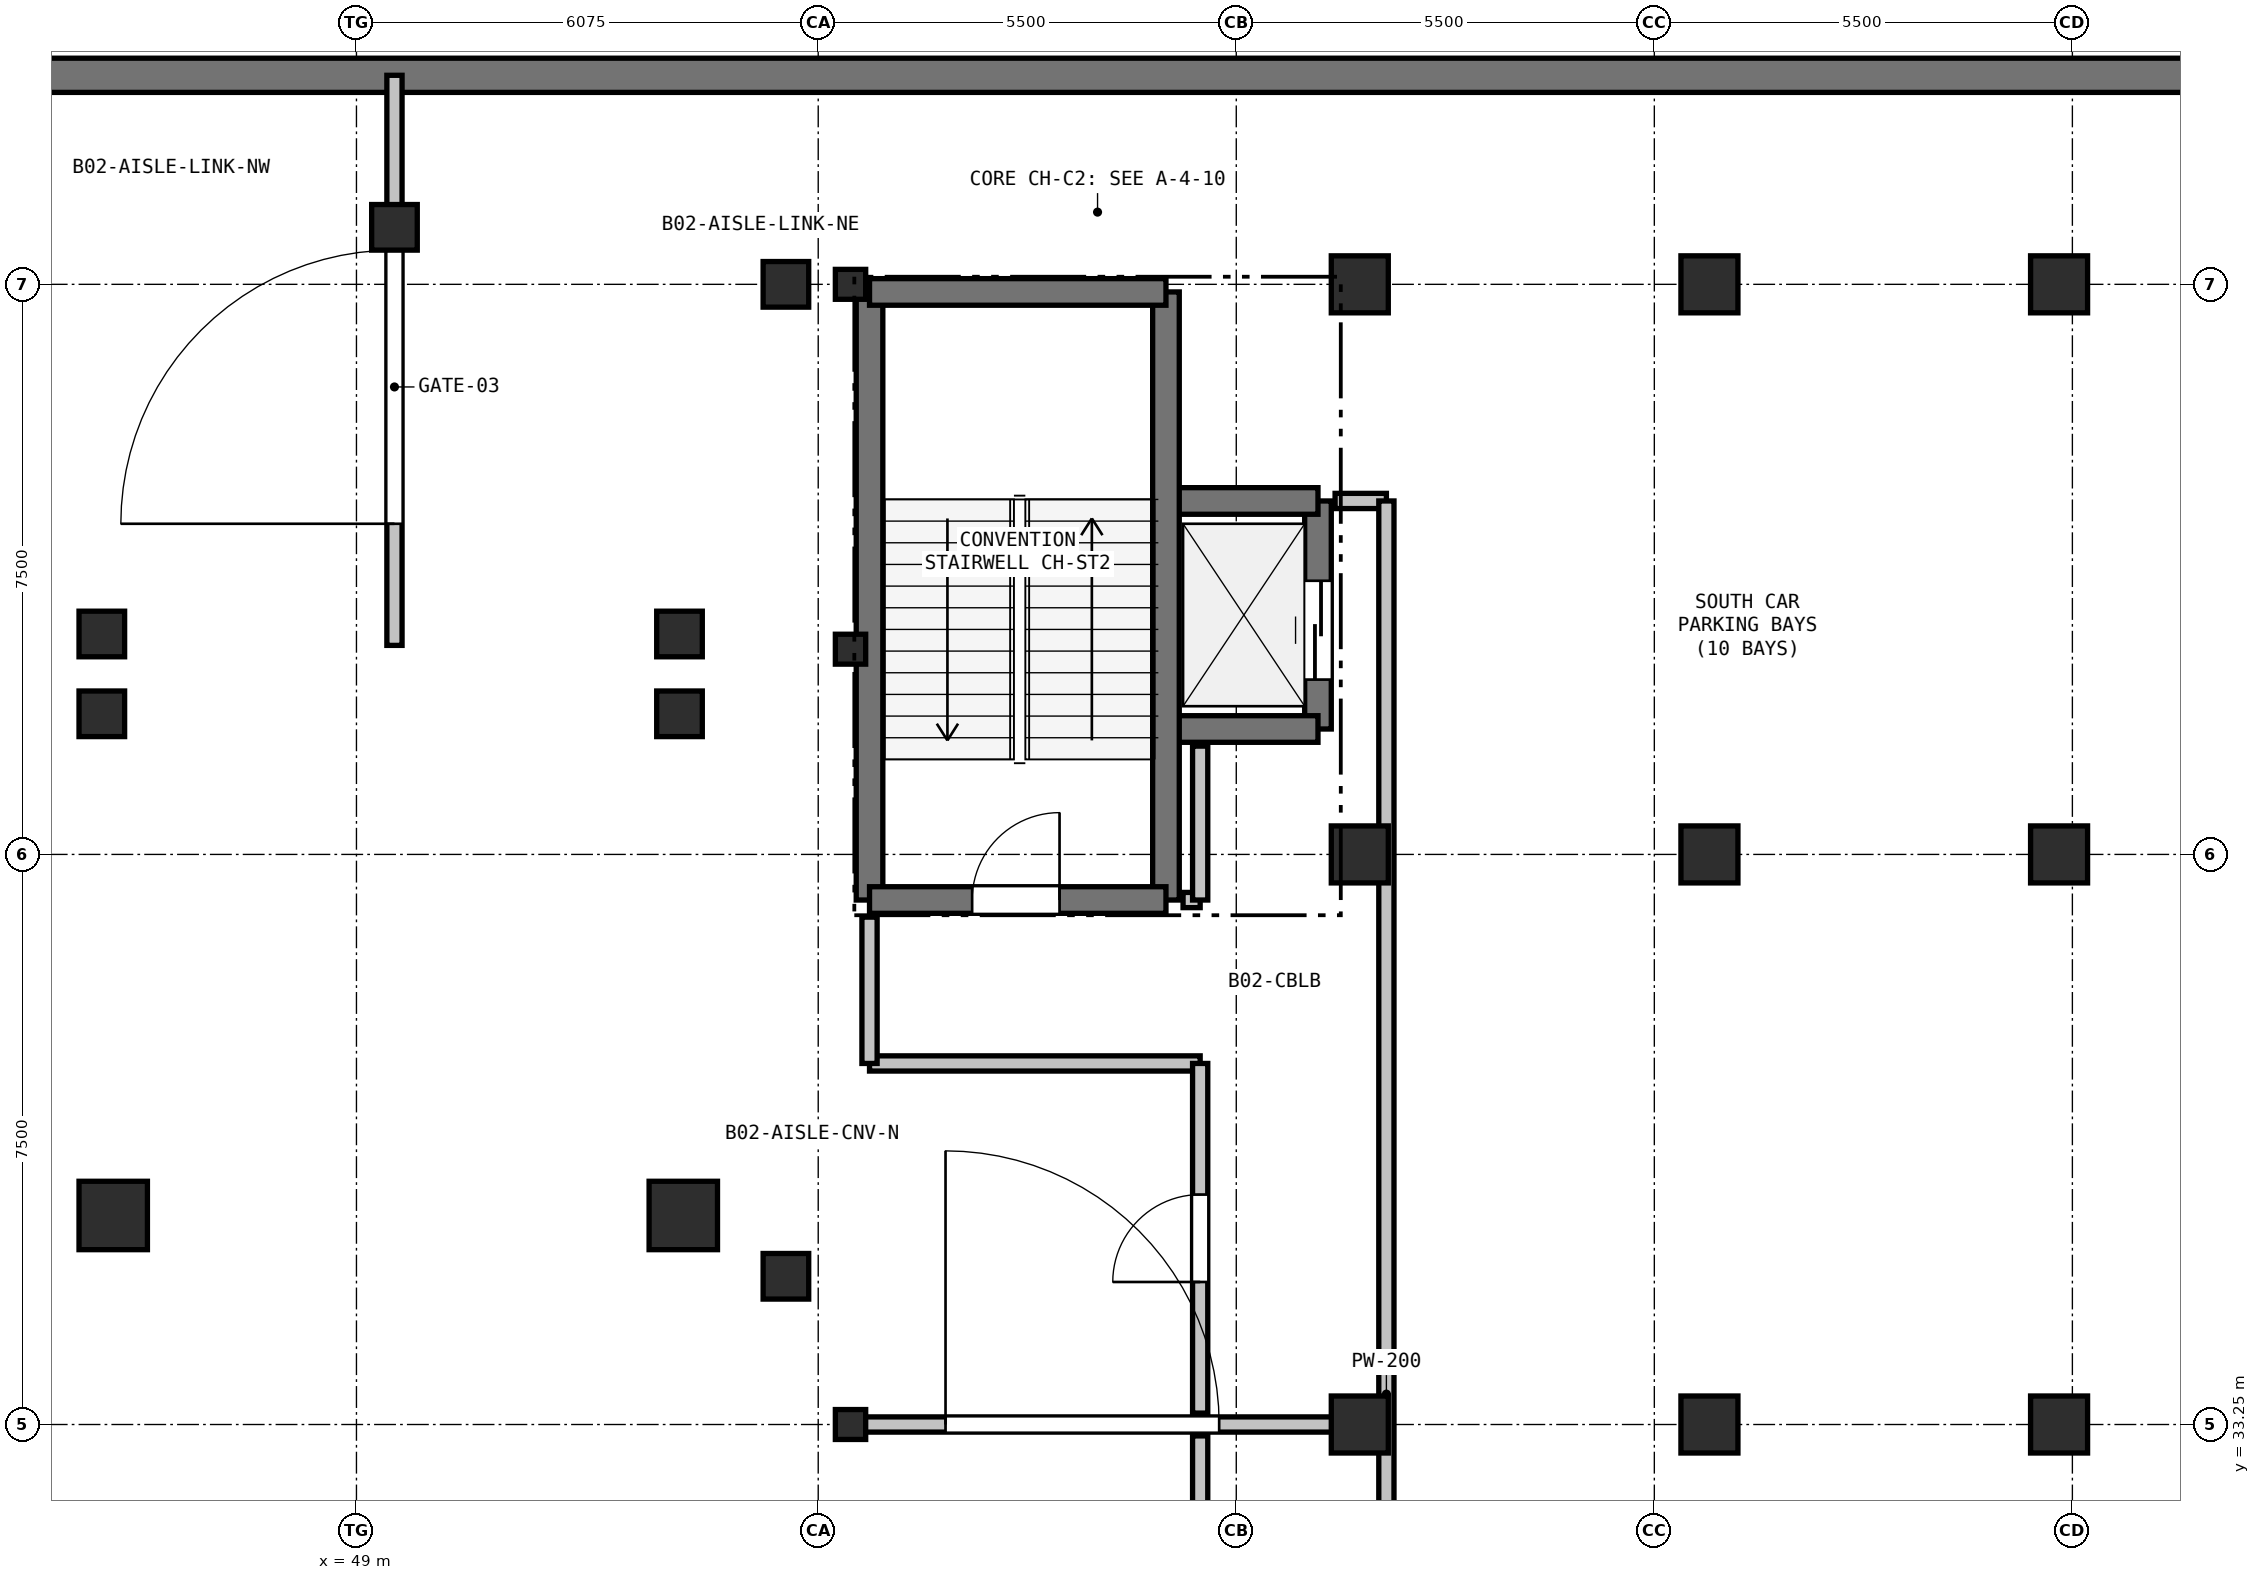
"""IFC4 building model, lengths in metres.
Left out: names, types, materials, properties, quantities, classifications, styles, units other than length and angle.
Written with IfcOpenShell. Run it as: python <this file> out.ifc"""

import sys

from ifc_helpers import new_model, si_unit, direction, frame, frame_2d, origin, origin_2d, place, context, subcontext, project, spatial, rectangle, i_section, extrude, element, fill, save


model = new_model("IFC4")
c1 = context("Model", 3, precision=1e-05, world=origin(), true_north=direction((0.0, 1.0)))
c2 = subcontext(c1, "Body", "Model", "MODEL_VIEW")
j1 = project(units=[si_unit("LENGTHUNIT", "METRE"), si_unit("PLANEANGLEUNIT", "RADIAN")], contexts=[c1])
p1 = place(None, origin())
s1 = spatial("IfcSite", under=j1, at=p1, CompositionType="ELEMENT")
p2 = place(p1, origin())
s2 = spatial("IfcBuilding", under=s1, at=p2, CompositionType="ELEMENT")
p3 = place(p2, frame((0.0, 0.0, -9.0)))
s3 = spatial("IfcBuildingStorey", under=s2, at=p3, CompositionType="ELEMENT", Elevation=-9.0)
p4 = place(p3, frame((77.0, 51.0, 0.0), z_axis=(0.0, 0.0, 1.0), x_axis=(-1.0, 0.0, 0.0)))
e1 = element("IfcWall", 1, at=p4, inside=s3, PredefinedType="USERDEFINED", context=c2, shape_type="SweptSolid", body=[
    extrude(rectangle(XDim=81.5, YDim=0.45, at=frame_2d((40.75, 0.0))), origin(), (0.0, 0.0, 1.0), 4.5),
])
for number, where, z_axis, x_axis in (
    (2, (45.65, 42.6, 0.0), (0.0, 0.0, 1.0), (1.0, 0.0, 0.0)),
    (3, (53.25, 42.6, 0.0), (0.0, 0.0, 1.0), (1.0, 0.0, 0.0)),
    (4, (49.5, 49.0, 0.0), (0.0, 0.0, 1.0), (1.0, 0.0, 0.0)),
    (5, (45.65, 43.65, 0.0), (0.0, 0.0, 1.0), (1.0, 0.0, 0.0)),
    (6, (53.25, 43.65, 0.0), (0.0, 0.0, 1.0), (1.0, 0.0, 0.0)),
):
    element("IfcColumn", number, at=place(p3, frame(where, z_axis=z_axis, x_axis=x_axis)), inside=s3, PredefinedType="COLUMN", context=c2, shape_type="SweptSolid", body=[
        extrude(rectangle(XDim=0.6, YDim=0.6, at=origin_2d()), origin(), (0.0, 0.0, 1.0), 4.5),
    ])
for number, where, z_axis, x_axis in (
    (7, (45.8, 36.0, 0.0), (0.0, 0.0, 1.0), (1.0, 0.0, 0.0)),
    (8, (53.3, 36.0, 0.0), (0.0, 0.0, 1.0), (1.0, 0.0, 0.0)),
):
    element("IfcColumn", number, at=place(p3, frame(where, z_axis=z_axis, x_axis=x_axis)), inside=s3, PredefinedType="COLUMN", context=c2, shape_type="SweptSolid", body=[
        extrude(rectangle(XDim=0.9, YDim=0.9, at=origin_2d()), origin(), (0.0, 0.0, 1.0), 4.5),
    ])
for number, where, z_axis, x_axis in (
    (9, (54.65, 35.2, 0.0), (0.0, 0.0, 1.0), (1.0, 0.0, 0.0)),
    (10, (54.65, 48.25, 0.0), (0.0, 0.0, 1.0), (1.0, 0.0, 0.0)),
):
    element("IfcColumn", number, at=place(p3, frame(where, z_axis=z_axis, x_axis=x_axis)), inside=s3, PredefinedType="COLUMN", context=c2, shape_type="SweptSolid", body=[
        extrude(rectangle(XDim=0.6, YDim=0.6, at=origin_2d()), origin(), (0.0, 0.0, 1.0), 4.2),
    ])
for number, where, z_axis, x_axis in (
    (11, (55.5, 33.25, 0.0), (0.0, 0.0, 1.0), (1.0, 0.0, 0.0)),
    (12, (55.5, 43.45, 0.0), (0.0, 0.0, 1.0), (1.0, 0.0, 0.0)),
    (13, (55.5, 48.25, 0.0), (0.0, 0.0, 1.0), (1.0, 0.0, 0.0)),
):
    element("IfcColumn", number, at=place(p3, frame(where, z_axis=z_axis, x_axis=x_axis)), inside=s3, PredefinedType="COLUMN", context=c2, shape_type="SweptSolid", body=[
        extrude(i_section(OverallWidth=0.399, OverallDepth=0.394, WebThickness=0.023, FlangeThickness=0.037, at=origin_2d()), origin(), (0.0, 0.0, 1.0), 4.5),
    ])
for number, where, z_axis, x_axis in (
    (14, (62.2, 33.25, 0.0), (0.0, 0.0, 1.0), (1.0, 0.0, 0.0)),
    (15, (62.2, 40.75, 0.0), (0.0, 0.0, 1.0), (1.0, 0.0, 0.0)),
    (16, (62.2, 48.25, 0.0), (0.0, 0.0, 1.0), (1.0, 0.0, 0.0)),
    (17, (66.8, 33.25, 0.0), (0.0, 0.0, 1.0), (1.0, 0.0, 0.0)),
    (18, (66.8, 40.75, 0.0), (0.0, 0.0, 1.0), (1.0, 0.0, 0.0)),
    (19, (66.8, 48.25, 0.0), (0.0, 0.0, 1.0), (1.0, 0.0, 0.0)),
    (20, (71.4, 33.25, 0.0), (0.0, 0.0, 1.0), (1.0, 0.0, 0.0)),
    (21, (71.4, 40.75, 0.0), (0.0, 0.0, 1.0), (1.0, 0.0, 0.0)),
    (22, (71.4, 48.25, 0.0), (0.0, 0.0, 1.0), (1.0, 0.0, 0.0)),
):
    element("IfcColumn", number, at=place(p3, frame(where, z_axis=z_axis, x_axis=x_axis)), inside=s3, PredefinedType="COLUMN", context=c2, shape_type="SweptSolid", body=[
        extrude(rectangle(XDim=0.75, YDim=0.75, at=origin_2d()), origin(), (0.0, 0.0, 1.0), 4.5),
    ])
p5 = place(p3, frame((61.65, 42.4, 0.0), z_axis=(0.0, 0.0, 1.0), x_axis=(0.0, 1.0, 0.0)))
e23 = element("IfcWall", 23, at=p5, inside=s3, PredefinedType="SHEAR", context=c2, shape_type="SweptSolid", body=[
    extrude(rectangle(XDim=3.0, YDim=0.35, at=frame_2d((1.5, 0.0))), origin(), (0.0, 0.0, 1.0), 4.2),
])
p6 = place(p5, frame((0.65, 0.0, 0.0)))
e24 = element("IfcOpeningElement", 24, at=p6, cuts=e23, PredefinedType="OPENING", context=c2, shape_type="SweptSolid", body=[
    extrude(rectangle(XDim=1.3, YDim=2.2, at=frame_2d((0.65, 1.1))), frame((0.0, 0.185, 0.0), z_axis=(0.0, -1.0, 0.0), x_axis=(1.0, 0.0, 0.0)), (0.0, 0.0, 1.0), 0.37),
])
for number, where, z_axis, x_axis in (
    (25, (59.65, 45.4, 0.0), (0.0, 0.0, 1.0), (1.0, 0.0, 0.0)),
    (26, (59.65, 42.4, 0.0), (0.0, 0.0, 1.0), (1.0, 0.0, 0.0)),
):
    element("IfcWall", number, at=place(p3, frame(where, z_axis=z_axis, x_axis=x_axis)), inside=s3, PredefinedType="SHEAR", context=c2, shape_type="SweptSolid", body=[
        extrude(rectangle(XDim=2.0, YDim=0.35, at=frame_2d((1.0, 0.0))), origin(), (0.0, 0.0, 1.0), 4.2),
    ])
for number, where, z_axis, x_axis in (
    (27, (59.65, 48.15, 0.0), (0.0, 0.0, 1.0), (0.0, -1.0, 0.0)),
    (28, (55.75, 40.15, 0.0), (0.0, 0.0, 1.0), (0.0, 1.0, 0.0)),
):
    element("IfcWall", number, at=place(p3, frame(where, z_axis=z_axis, x_axis=x_axis)), inside=s3, PredefinedType="SHEAR", context=c2, shape_type="SweptSolid", body=[
        extrude(rectangle(XDim=8.0, YDim=0.35, at=frame_2d((4.0, 0.0))), origin(), (0.0, 0.0, 1.0), 4.2),
    ])
p7 = place(p3, frame((55.75, 48.15, 0.0), z_axis=(0.0, 0.0, 1.0), x_axis=(1.0, 0.0, 0.0)))
e29 = element("IfcWall", 29, at=p7, inside=s3, PredefinedType="SHEAR", context=c2, shape_type="SweptSolid", body=[
    extrude(rectangle(XDim=3.9, YDim=0.35, at=frame_2d((1.95, 0.0))), origin(), (0.0, 0.0, 1.0), 4.2),
])
p8 = place(p3, frame((55.75, 40.15, 0.0), z_axis=(0.0, 0.0, 1.0), x_axis=(1.0, 0.0, 0.0)))
e30 = element("IfcWall", 30, at=p8, inside=s3, PredefinedType="SHEAR", context=c2, shape_type="SweptSolid", body=[
    extrude(rectangle(XDim=3.9, YDim=0.35, at=frame_2d((1.95, 0.0))), origin(), (0.0, 0.0, 1.0), 4.2),
])
p9 = place(p8, frame((1.35, 0.0, 0.0)))
e31 = element("IfcOpeningElement", 31, at=p9, cuts=e30, PredefinedType="OPENING", context=c2, shape_type="SweptSolid", body=[
    extrude(rectangle(XDim=1.15, YDim=2.15, at=frame_2d((0.575, 1.075))), frame((0.0, 0.185, 0.0), z_axis=(0.0, -1.0, 0.0), x_axis=(1.0, 0.0, 0.0)), (0.0, 0.0, 1.0), 0.37),
])
p10 = place(p3, frame((49.5, 43.5, 0.0), z_axis=(0.0, 0.0, 1.0), x_axis=(0.0, 1.0, 0.0)))
e32 = element("IfcWall", 32, at=p10, inside=s3, PredefinedType="PARTITIONING", context=c2, shape_type="SweptSolid", body=[
    extrude(rectangle(XDim=7.5, YDim=0.2, at=frame_2d((3.75, 0.0))), origin(), (0.0, 0.0, 1.0), 4.2),
])
p11 = place(p10, frame((1.6, 0.0, 0.0)))
e33 = element("IfcOpeningElement", 33, at=p11, cuts=e32, PredefinedType="OPENING", context=c2, shape_type="SweptSolid", body=[
    extrude(rectangle(XDim=3.6, YDim=2.8, at=frame_2d((1.8, 1.4))), frame((0.0, 0.11, 0.0), z_axis=(0.0, -1.0, 0.0), x_axis=(1.0, 0.0, 0.0)), (0.0, 0.0, 1.0), 0.22),
])
p12 = place(p3, frame((55.5, 33.25, 0.0), z_axis=(0.0, 0.0, 1.0), x_axis=(1.0, 0.0, 0.0)))
e34 = element("IfcWall", 34, at=p12, inside=s3, PredefinedType="PARTITIONING", context=c2, shape_type="SweptSolid", body=[
    extrude(rectangle(XDim=6.7, YDim=0.2, at=frame_2d((3.35, 0.0))), origin(), (0.0, 0.0, 1.0), 4.2),
])
p13 = place(p12, frame((1.25, 0.0, 0.0)))
e35 = element("IfcOpeningElement", 35, at=p13, cuts=e34, PredefinedType="OPENING", context=c2, shape_type="SweptSolid", body=[
    extrude(rectangle(XDim=3.6, YDim=2.8, at=frame_2d((1.8, 1.4))), frame((0.0, 0.11, 0.0), z_axis=(0.0, -1.0, 0.0), x_axis=(1.0, 0.0, 0.0)), (0.0, 0.0, 1.0), 0.22),
])
p14 = place(p3, frame((60.1, 38.0, 0.0), z_axis=(0.0, 0.0, 1.0), x_axis=(-1.0, 0.0, 0.0)))
e36 = element("IfcWall", 36, at=p14, inside=s3, PredefinedType="PARTITIONING", context=c2, shape_type="SweptSolid", body=[
    extrude(rectangle(XDim=4.35, YDim=0.2, at=frame_2d((2.175, 0.0))), origin(), (0.0, 0.0, 1.0), 4.2),
])
p15 = place(p3, frame((55.75, 38.0, 0.0), z_axis=(0.0, 0.0, 1.0), x_axis=(0.0, 1.0, 0.0)))
e37 = element("IfcWall", 37, at=p15, inside=s3, PredefinedType="PARTITIONING", context=c2, shape_type="SweptSolid", body=[
    extrude(rectangle(XDim=1.925, YDim=0.2, at=frame_2d((0.962, 0.0))), origin(), (0.0, 0.0, 1.0), 4.2),
])
p16 = place(p3, frame((59.875, 40.15, 0.0), z_axis=(0.0, 0.0, 1.0), x_axis=(1.0, 0.0, 0.0)))
e38 = element("IfcWall", 38, at=p16, inside=s3, PredefinedType="PARTITIONING", context=c2, shape_type="SweptSolid", body=[
    extrude(rectangle(XDim=0.225, YDim=0.2, at=frame_2d((0.113, 0.0))), origin(), (0.0, 0.0, 1.0), 4.2),
])
p17 = place(p3, frame((60.1, 40.15, 0.0), z_axis=(0.0, 0.0, 1.0), x_axis=(0.0, 1.0, 0.0)))
e39 = element("IfcWall", 39, at=p17, inside=s3, PredefinedType="PARTITIONING", context=c2, shape_type="SweptSolid", body=[
    extrude(rectangle(XDim=2.025, YDim=0.2, at=frame_2d((1.013, 0.0))), origin(), (0.0, 0.0, 1.0), 4.2),
])
p18 = place(p3, frame((61.875, 45.4, 0.0), z_axis=(0.0, 0.0, 1.0), x_axis=(1.0, 0.0, 0.0)))
e40 = element("IfcWall", 40, at=p18, inside=s3, PredefinedType="PARTITIONING", context=c2, shape_type="SweptSolid", body=[
    extrude(rectangle(XDim=0.675, YDim=0.2, at=frame_2d((0.337, 0.0))), origin(), (0.0, 0.0, 1.0), 4.2),
])
p19 = place(p3, frame((62.55, 45.4, 0.0), z_axis=(0.0, 0.0, 1.0), x_axis=(0.0, -1.0, 0.0)))
e41 = element("IfcWall", 41, at=p19, inside=s3, PredefinedType="PARTITIONING", context=c2, shape_type="SweptSolid", body=[
    extrude(rectangle(XDim=23.5, YDim=0.2, at=frame_2d((11.75, 0.0))), origin(), (0.0, 0.0, 1.0), 4.2),
])
p20 = place(p3, frame((60.1, 18.4, 0.0), z_axis=(0.0, 0.0, 1.0), x_axis=(0.0, 1.0, 0.0)))
e42 = element("IfcWall", 42, at=p20, inside=s3, PredefinedType="PARTITIONING", context=c2, shape_type="SweptSolid", body=[
    extrude(rectangle(XDim=14.7, YDim=0.2, at=frame_2d((7.35, 0.0))), origin(), (0.0, 0.0, 1.0), 4.2),
])
p21 = place(p20, frame((6.775, 0.0, 0.0)))
e43 = element("IfcOpeningElement", 43, at=p21, cuts=e42, PredefinedType="OPENING", context=c2, shape_type="SweptSolid", body=[
    extrude(rectangle(XDim=1.15, YDim=2.15, at=frame_2d((0.575, 1.075))), frame((0.0, 0.11, 0.0), z_axis=(0.0, -1.0, 0.0), x_axis=(1.0, 0.0, 0.0)), (0.0, 0.0, 1.0), 0.22),
])
p22 = place(p3, frame((60.1, 33.4, 0.0), z_axis=(0.0, 0.0, 1.0), x_axis=(0.0, 1.0, 0.0)))
e44 = element("IfcWall", 44, at=p22, inside=s3, PredefinedType="PARTITIONING", context=c2, shape_type="SweptSolid", body=[
    extrude(rectangle(XDim=4.6, YDim=0.2, at=frame_2d((2.3, 0.0))), origin(), (0.0, 0.0, 1.0), 4.2),
])
p23 = place(p22, frame((1.725, 0.0, 0.0)))
e45 = element("IfcOpeningElement", 45, at=p23, cuts=e44, PredefinedType="OPENING", context=c2, shape_type="SweptSolid", body=[
    extrude(rectangle(XDim=1.15, YDim=2.15, at=frame_2d((0.575, 1.075))), frame((0.0, 0.11, 0.0), z_axis=(0.0, -1.0, 0.0), x_axis=(1.0, 0.0, 0.0)), (0.0, 0.0, 1.0), 0.22),
])
p24 = place(p6, origin())
e46 = element("IfcDoor", 46, at=p24, inside=s3, OperationType="SLIDING_TO_LEFT", PredefinedType="DOOR", context=c2, shape_type="SweptSolid", body=[
    extrude(rectangle(XDim=1.3, YDim=2.2, at=frame_2d((0.65, 1.1))), frame((0.0, 0.025, 0.0), z_axis=(0.0, -1.0, 0.0), x_axis=(1.0, 0.0, 0.0)), (0.0, 0.0, 1.0), 0.05),
])
fill(e24, e46)
p25 = place(p9, origin())
e47 = element("IfcDoor", 47, at=p25, inside=s3, OperationType="SINGLE_SWING_RIGHT", PredefinedType="DOOR", context=c2, shape_type="SweptSolid", body=[
    extrude(rectangle(XDim=1.15, YDim=2.15, at=frame_2d((0.575, 1.075))), frame((0.0, 0.025, 0.0), z_axis=(0.0, -1.0, 0.0), x_axis=(1.0, 0.0, 0.0)), (0.0, 0.0, 1.0), 0.05),
])
fill(e31, e47)
p26 = place(p11, origin())
e48 = element("IfcDoor", 48, at=p26, inside=s3, OperationType="ROLLINGUP", PredefinedType="GATE", context=c2, shape_type="SweptSolid", body=[
    extrude(rectangle(XDim=3.6, YDim=2.8, at=frame_2d((1.8, 1.4))), frame((0.0, 0.025, 0.0), z_axis=(0.0, -1.0, 0.0), x_axis=(1.0, 0.0, 0.0)), (0.0, 0.0, 1.0), 0.05),
])
fill(e33, e48)
p27 = place(p13, origin())
e49 = element("IfcDoor", 49, at=p27, inside=s3, OperationType="ROLLINGUP", PredefinedType="GATE", context=c2, shape_type="SweptSolid", body=[
    extrude(rectangle(XDim=3.6, YDim=2.8, at=frame_2d((1.8, 1.4))), frame((0.0, 0.025, 0.0), z_axis=(0.0, -1.0, 0.0), x_axis=(1.0, 0.0, 0.0)), (0.0, 0.0, 1.0), 0.05),
])
fill(e35, e49)
p28 = place(p23, origin())
e50 = element("IfcDoor", 50, at=p28, inside=s3, OperationType="SINGLE_SWING_LEFT", PredefinedType="DOOR", context=c2, shape_type="SweptSolid", body=[
    extrude(rectangle(XDim=1.15, YDim=2.15, at=frame_2d((0.575, 1.075))), frame((0.0, 0.025, 0.0), z_axis=(0.0, -1.0, 0.0), x_axis=(1.0, 0.0, 0.0)), (0.0, 0.0, 1.0), 0.05),
])
fill(e45, e50)
save(model, sys.argv[1])
